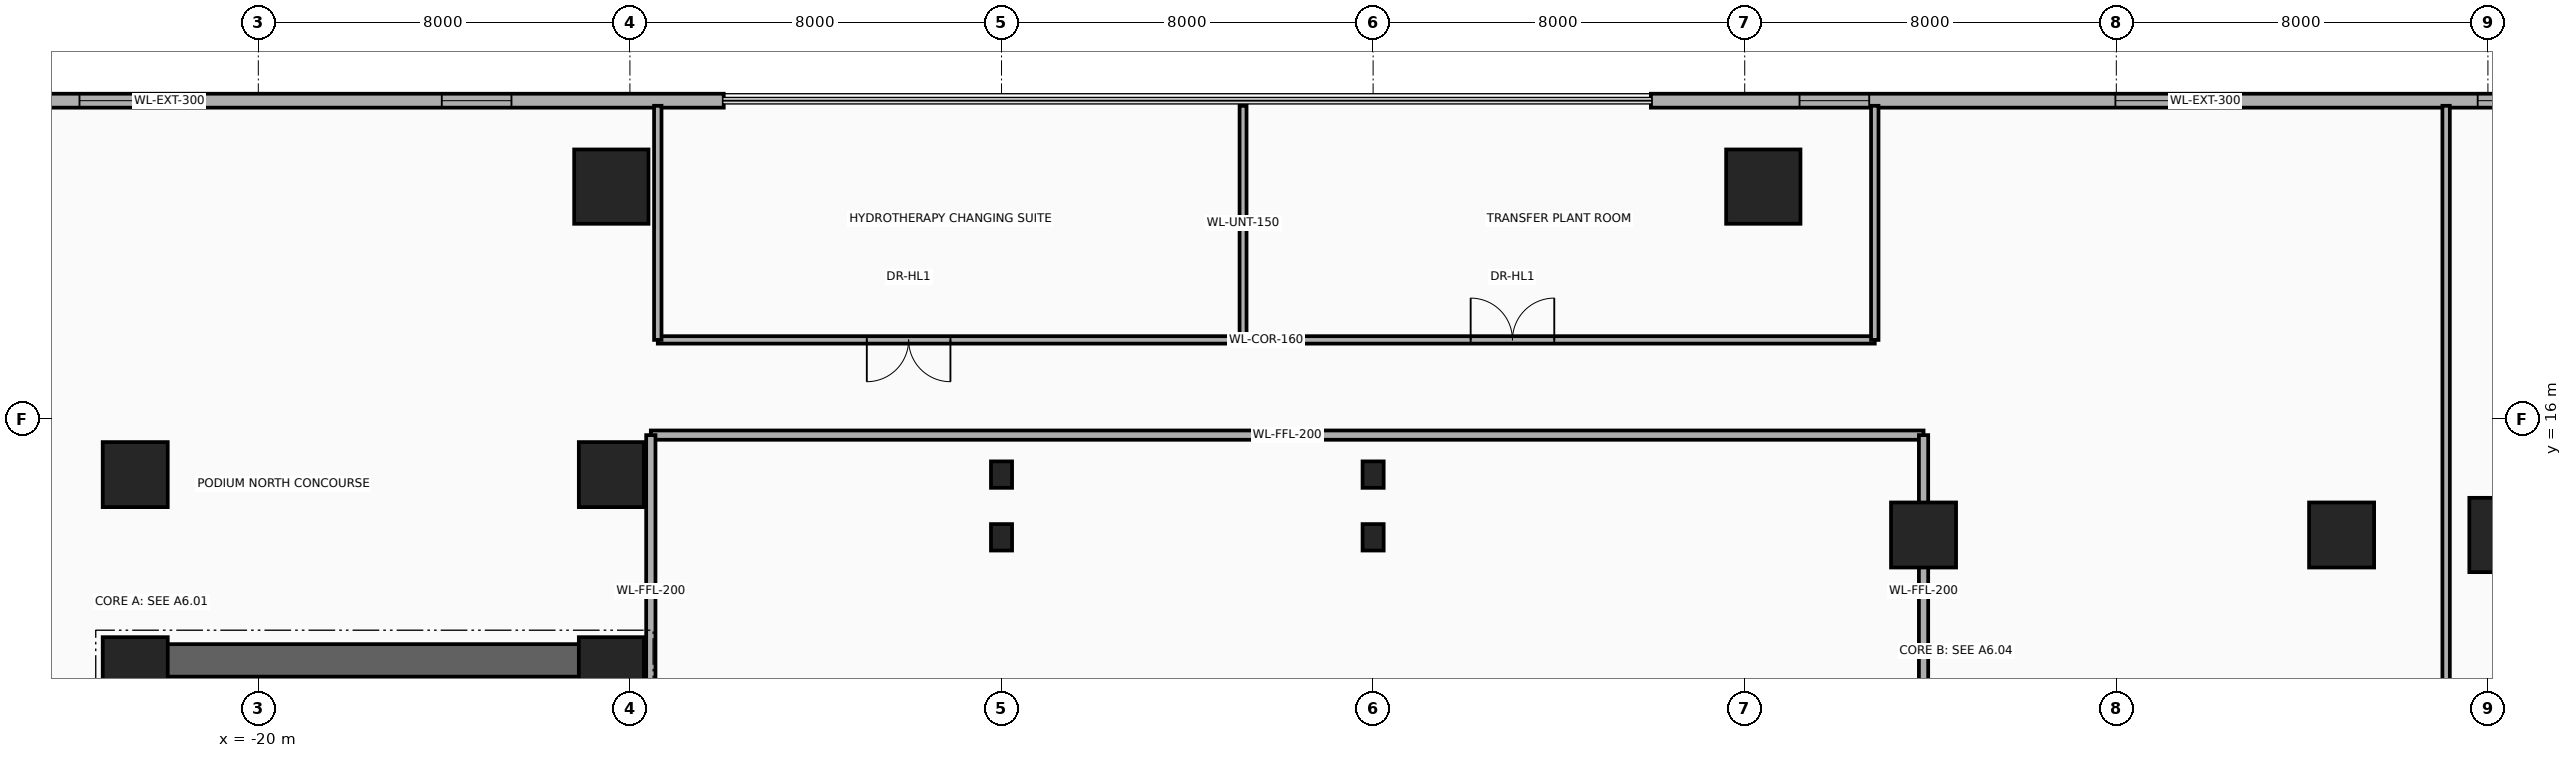
"""IFC4 building model, lengths in metres.
Left out: names, types, materials, properties, quantities, classifications, styles, units other than length and angle.
Written with IfcOpenShell. Run it as: python <this file> out.ifc"""

import sys

from ifc_helpers import new_model, si_unit, direction, frame, frame_2d, origin, origin_2d, place, context, subcontext, project, spatial, rectangle, i_section, extrude, source, transform, mapped, element, fill, save


model = new_model("IFC4")
c1 = context("Model", 3, precision=1e-05, world=origin(), true_north=direction((0.0, 1.0)))
c2 = subcontext(c1, "Body", "Model", "MODEL_VIEW")
j1 = project(units=[si_unit("LENGTHUNIT", "METRE"), si_unit("PLANEANGLEUNIT", "RADIAN")], contexts=[c1])
p1 = place(None, origin())
s1 = spatial("IfcSite", under=j1, at=p1, CompositionType="ELEMENT")
p2 = place(p1, origin())
s2 = spatial("IfcBuilding", under=s1, at=p2, CompositionType="ELEMENT")
p3 = place(p2, frame((0.0, 0.0, 20.8)))
s3 = spatial("IfcBuildingStorey", under=s2, at=p3, CompositionType="ELEMENT", Elevation=20.8)
for number, where, z_axis, x_axis in (
    (1, (-22.16, 1.78, 0.0), (0.0, 0.0, 1.0), (0.0, 1.0, 0.0)),
    (2, (-18.83, 1.78, 0.0), (0.0, 0.0, 1.0), (0.0, 1.0, 0.0)),
):
    element("IfcWall", number, at=place(p3, frame(where, z_axis=z_axis, x_axis=x_axis)), inside=s3, PredefinedType="SHEAR", context=c2, shape_type="SweptSolid", body=[
        extrude(rectangle(XDim=8.67, YDim=0.22, at=frame_2d((4.335, 0.0))), origin(), (0.0, 0.0, 1.0), 4.96),
    ])
p4 = place(p3, frame((-22.65, -11.15, 0.0), z_axis=(0.0, 0.0, 1.0), x_axis=(0.0, 1.0, 0.0)))
e3 = element("IfcWall", 3, at=p4, inside=s3, PredefinedType="SHEAR", context=c2, shape_type="SweptSolid", body=[
    extrude(rectangle(XDim=22.3, YDim=0.7, at=frame_2d((11.15, 0.0))), origin(), (0.0, 0.0, 1.0), 4.96),
])
p5 = place(p3, frame((-22.65, 10.8, 0.0), z_axis=(0.0, 0.0, 1.0), x_axis=(1.0, 0.0, 0.0)))
e4 = element("IfcWall", 4, at=p5, inside=s3, PredefinedType="SHEAR", context=c2, shape_type="SweptSolid", body=[
    extrude(rectangle(XDim=10.25, YDim=0.7, at=frame_2d((5.125, 0.0))), origin(), (0.0, 0.0, 1.0), 4.96),
])
m1 = source(origin(), c2, "Body", "SweptSolid", [
    extrude(rectangle(XDim=1.4, YDim=1.4, at=origin_2d()), origin(), (0.0, 0.0, 1.0), 5.2),
])
for number, where, z_axis, x_axis in (
    (5, (-22.65, 10.6, 0.0), (0.0, 0.0, 1.0), (1.0, 0.0, 0.0)),
    (6, (-12.4, 10.6, 0.0), (0.0, 0.0, 1.0), (1.0, 0.0, 0.0)),
    (7, (-22.65, 14.8, 0.0), (0.0, 0.0, 1.0), (1.0, 0.0, 0.0)),
    (8, (-12.4, 14.8, 0.0), (0.0, 0.0, 1.0), (1.0, 0.0, 0.0)),
    (9, (15.85, 13.5, 0.0), (0.0, 0.0, 1.0), (1.0, 0.0, 0.0)),
    (10, (24.85, 13.5, 0.0), (0.0, 0.0, 1.0), (1.0, 0.0, 0.0)),
):
    element("IfcColumn", number, at=place(p3, frame(where, z_axis=z_axis, x_axis=x_axis)), inside=s3, PredefinedType="COLUMN", context=c2, shape_type="MappedRepresentation", body=[
        mapped(m1, transform((0.0, 0.0, 0.0), x_axis=(1.0, 0.0, 0.0), y_axis=(0.0, 1.0, 0.0), z_axis=(0.0, 0.0, 1.0), scale=1.0)),
    ])
m2 = source(origin(), c2, "Body", "SweptSolid", [
    extrude(rectangle(XDim=1.6, YDim=1.6, at=origin_2d()), origin(), (0.0, 0.0, 1.0), 5.2),
])
for number, where, z_axis, x_axis in (
    (11, (28.4, 13.5, 0.0), (0.0, 0.0, 1.0), (1.0, 0.0, 0.0)),
    (12, (-12.4, 21.0, 0.0), (0.0, 0.0, 1.0), (1.0, 0.0, 0.0)),
    (13, (12.4, 21.0, 0.0), (0.0, 0.0, 1.0), (1.0, 0.0, 0.0)),
):
    element("IfcColumn", number, at=place(p3, frame(where, z_axis=z_axis, x_axis=x_axis)), inside=s3, PredefinedType="COLUMN", context=c2, shape_type="MappedRepresentation", body=[
        mapped(m2, transform((0.0, 0.0, 0.0), x_axis=(1.0, 0.0, 0.0), y_axis=(0.0, 1.0, 0.0), z_axis=(0.0, 0.0, 1.0), scale=1.0)),
    ])
m3 = source(origin(), c2, "Body", "SweptSolid", [
    extrude(i_section(OverallWidth=0.454, OverallDepth=0.569, WebThickness=0.078, FlangeThickness=0.125, at=origin_2d()), origin(), (0.0, 0.0, 1.0), 5.2),
])
for number, where, z_axis, x_axis in (
    (14, (-4.0, 13.45, 0.0), (0.0, 0.0, 1.0), (1.0, 0.0, 0.0)),
    (15, (-4.0, 14.8, 0.0), (0.0, 0.0, 1.0), (1.0, 0.0, 0.0)),
    (16, (4.0, 13.45, 0.0), (0.0, 0.0, 1.0), (1.0, 0.0, 0.0)),
    (17, (4.0, 14.8, 0.0), (0.0, 0.0, 1.0), (1.0, 0.0, 0.0)),
):
    element("IfcColumn", number, at=place(p3, frame(where, z_axis=z_axis, x_axis=x_axis)), inside=s3, PredefinedType="COLUMN", context=c2, shape_type="MappedRepresentation", body=[
        mapped(m3, transform((0.0, 0.0, 0.0), x_axis=(1.0, 0.0, 0.0), y_axis=(0.0, 1.0, 0.0), z_axis=(0.0, 0.0, 1.0), scale=1.0)),
    ])
p6 = place(p3, frame((-33.85, 22.85, 0.0), z_axis=(0.0, 0.0, 1.0), x_axis=(1.0, 0.0, 0.0)))
e18 = element("IfcWall", 18, at=p6, inside=s3, PredefinedType="SOLIDWALL", context=c2, shape_type="SweptSolid", body=[
    extrude(rectangle(XDim=23.87, YDim=0.3, at=frame_2d((11.935, 0.0))), origin(), (0.0, 0.0, 1.0), 4.96),
])
p7 = place(p6, frame((3.2, 0.0, 0.9)))
e19 = element("IfcOpeningElement", 19, at=p7, cuts=e18, PredefinedType="OPENING", context=c2, shape_type="SweptSolid", body=[
    extrude(rectangle(XDim=1.5, YDim=1.75, at=frame_2d((0.75, 0.875))), frame((0.0, 0.165, 0.0), z_axis=(0.0, -1.0, 0.0), x_axis=(1.0, 0.0, 0.0)), (0.0, 0.0, 1.0), 0.33),
])
p8 = place(p6, frame((10.0, 0.0, 0.9)))
e20 = element("IfcOpeningElement", 20, at=p8, cuts=e18, PredefinedType="OPENING", context=c2, shape_type="SweptSolid", body=[
    extrude(rectangle(XDim=1.5, YDim=1.75, at=frame_2d((0.75, 0.875))), frame((0.0, 0.165, 0.0), z_axis=(0.0, -1.0, 0.0), x_axis=(1.0, 0.0, 0.0)), (0.0, 0.0, 1.0), 0.33),
])
p9 = place(p6, frame((17.8, 0.0, 0.9)))
e21 = element("IfcOpeningElement", 21, at=p9, cuts=e18, PredefinedType="OPENING", context=c2, shape_type="SweptSolid", body=[
    extrude(rectangle(XDim=1.5, YDim=1.75, at=frame_2d((0.75, 0.875))), frame((0.0, 0.165, 0.0), z_axis=(0.0, -1.0, 0.0), x_axis=(1.0, 0.0, 0.0)), (0.0, 0.0, 1.0), 0.33),
])
p10 = place(p3, frame((9.98, 22.85, 0.0), z_axis=(0.0, 0.0, 1.0), x_axis=(1.0, 0.0, 0.0)))
e22 = element("IfcWall", 22, at=p10, inside=s3, PredefinedType="SOLIDWALL", context=c2, shape_type="SweptSolid", body=[
    extrude(rectangle(XDim=23.87, YDim=0.3, at=frame_2d((11.935, 0.0))), origin(), (0.0, 0.0, 1.0), 4.96),
])
p11 = place(p10, frame((3.2, 0.0, 0.9)))
e23 = element("IfcOpeningElement", 23, at=p11, cuts=e22, PredefinedType="OPENING", context=c2, shape_type="SweptSolid", body=[
    extrude(rectangle(XDim=1.5, YDim=1.75, at=frame_2d((0.75, 0.875))), frame((0.0, 0.165, 0.0), z_axis=(0.0, -1.0, 0.0), x_axis=(1.0, 0.0, 0.0)), (0.0, 0.0, 1.0), 0.33),
])
p12 = place(p10, frame((10.0, 0.0, 0.9)))
e24 = element("IfcOpeningElement", 24, at=p12, cuts=e22, PredefinedType="OPENING", context=c2, shape_type="SweptSolid", body=[
    extrude(rectangle(XDim=1.5, YDim=1.75, at=frame_2d((0.75, 0.875))), frame((0.0, 0.165, 0.0), z_axis=(0.0, -1.0, 0.0), x_axis=(1.0, 0.0, 0.0)), (0.0, 0.0, 1.0), 0.33),
])
p13 = place(p10, frame((17.8, 0.0, 0.9)))
e25 = element("IfcOpeningElement", 25, at=p13, cuts=e22, PredefinedType="OPENING", context=c2, shape_type="SweptSolid", body=[
    extrude(rectangle(XDim=1.5, YDim=1.75, at=frame_2d((0.75, 0.875))), frame((0.0, 0.165, 0.0), z_axis=(0.0, -1.0, 0.0), x_axis=(1.0, 0.0, 0.0)), (0.0, 0.0, 1.0), 0.33),
])
p14 = place(p3, frame((-11.4, 17.7, 0.0), z_axis=(0.0, 0.0, 1.0), x_axis=(1.0, 0.0, 0.0)))
e26 = element("IfcWall", 26, at=p14, inside=s3, PredefinedType="PARTITIONING", context=c2, shape_type="SweptSolid", body=[
    extrude(rectangle(XDim=26.2, YDim=0.16, at=frame_2d((13.1, 0.0))), origin(), (0.0, 0.0, 1.0), 4.96),
])
p15 = place(p14, frame((4.5, 0.0, 0.0)))
e27 = element("IfcOpeningElement", 27, at=p15, cuts=e26, PredefinedType="OPENING", context=c2, shape_type="SweptSolid", body=[
    extrude(rectangle(XDim=1.8, YDim=2.15, at=frame_2d((0.9, 1.075))), frame((0.0, 0.095, 0.0), z_axis=(0.0, -1.0, 0.0), x_axis=(1.0, 0.0, 0.0)), (0.0, 0.0, 1.0), 0.19),
])
p16 = place(p14, frame((17.5, 0.0, 0.0)))
e28 = element("IfcOpeningElement", 28, at=p16, cuts=e26, PredefinedType="OPENING", context=c2, shape_type="SweptSolid", body=[
    extrude(rectangle(XDim=1.8, YDim=2.15, at=frame_2d((0.9, 1.075))), frame((0.0, 0.095, 0.0), z_axis=(0.0, -1.0, 0.0), x_axis=(1.0, 0.0, 0.0)), (0.0, 0.0, 1.0), 0.19),
])
for number, where, z_axis, x_axis in (
    (29, (-11.4, 17.7, 0.0), (0.0, 0.0, 1.0), (0.0, 1.0, 0.0)),
    (30, (14.8, 17.7, 0.0), (0.0, 0.0, 1.0), (0.0, 1.0, 0.0)),
):
    element("IfcWall", number, at=place(p3, frame(where, z_axis=z_axis, x_axis=x_axis)), inside=s3, PredefinedType="PARTITIONING", context=c2, shape_type="SweptSolid", body=[
        extrude(rectangle(XDim=5.04, YDim=0.16, at=frame_2d((2.52, 0.0))), origin(), (0.0, 0.0, 1.0), 3.997),
    ])
p17 = place(p3, frame((1.2, 17.7, 0.0), z_axis=(0.0, 0.0, 1.0), x_axis=(0.0, 1.0, 0.0)))
e31 = element("IfcWall", 31, at=p17, inside=s3, PredefinedType="PARTITIONING", context=c2, shape_type="SweptSolid", body=[
    extrude(rectangle(XDim=5.04, YDim=0.15, at=frame_2d((2.52, 0.0))), origin(), (0.0, 0.0, 1.0), 3.997),
])
p18 = place(p3, frame((27.1, -22.74, 0.0), z_axis=(0.0, 0.0, 1.0), x_axis=(0.0, 1.0, 0.0)))
e32 = element("IfcWall", 32, at=p18, inside=s3, PredefinedType="PARTITIONING", context=c2, shape_type="SweptSolid", body=[
    extrude(rectangle(XDim=45.48, YDim=0.16, at=frame_2d((22.74, 0.0))), origin(), (0.0, 0.0, 1.0), 3.745),
])
p19 = place(p18, frame((7.0, 0.0, 0.0)))
e33 = element("IfcOpeningElement", 33, at=p19, cuts=e32, PredefinedType="OPENING", context=c2, shape_type="SweptSolid", body=[
    extrude(rectangle(XDim=1.8, YDim=2.15, at=frame_2d((0.9, 1.075))), frame((0.0, 0.095, 0.0), z_axis=(0.0, -1.0, 0.0), x_axis=(1.0, 0.0, 0.0)), (0.0, 0.0, 1.0), 0.19),
])
p20 = place(p18, frame((25.0, 0.0, 0.0)))
e34 = element("IfcOpeningElement", 34, at=p20, cuts=e32, PredefinedType="OPENING", context=c2, shape_type="SweptSolid", body=[
    extrude(rectangle(XDim=1.8, YDim=2.15, at=frame_2d((0.9, 1.075))), frame((0.0, 0.095, 0.0), z_axis=(0.0, -1.0, 0.0), x_axis=(1.0, 0.0, 0.0)), (0.0, 0.0, 1.0), 0.19),
])
p21 = place(p3, frame((-11.55, 15.65, 0.0), z_axis=(0.0, 0.0, 1.0), x_axis=(1.0, 0.0, 0.0)))
e35 = element("IfcWall", 35, at=p21, inside=s3, PredefinedType="PARTITIONING", context=c2, shape_type="SweptSolid", body=[
    extrude(rectangle(XDim=27.4, YDim=0.2, at=frame_2d((13.7, 0.0))), origin(), (0.0, 0.0, 1.0), 4.96),
])
for number, where, z_axis, x_axis in (
    (36, (-11.55, 8.95, 0.0), (0.0, 0.0, 1.0), (0.0, 1.0, 0.0)),
    (37, (15.85, 8.95, 0.0), (0.0, 0.0, 1.0), (0.0, 1.0, 0.0)),
):
    element("IfcWall", number, at=place(p3, frame(where, z_axis=z_axis, x_axis=x_axis)), inside=s3, PredefinedType="PARTITIONING", context=c2, shape_type="SweptSolid", body=[
        extrude(rectangle(XDim=6.7, YDim=0.2, at=frame_2d((3.35, 0.0))), origin(), (0.0, 0.0, 1.0), 3.745),
    ])
p22 = place(p8, origin())
e38 = element("IfcWindow", 38, at=p22, inside=s3, PartitioningType="SINGLE_PANEL", PredefinedType="WINDOW", context=c2, shape_type="SweptSolid", body=[
    extrude(rectangle(XDim=1.5, YDim=1.75, at=frame_2d((0.75, 0.875))), frame((0.0, 0.03, 0.0), z_axis=(0.0, -1.0, 0.0), x_axis=(1.0, 0.0, 0.0)), (0.0, 0.0, 1.0), 0.06),
])
fill(e20, e38)
p23 = place(p9, origin())
e39 = element("IfcWindow", 39, at=p23, inside=s3, PartitioningType="SINGLE_PANEL", PredefinedType="WINDOW", context=c2, shape_type="SweptSolid", body=[
    extrude(rectangle(XDim=1.5, YDim=1.75, at=frame_2d((0.75, 0.875))), frame((0.0, 0.03, 0.0), z_axis=(0.0, -1.0, 0.0), x_axis=(1.0, 0.0, 0.0)), (0.0, 0.0, 1.0), 0.06),
])
fill(e21, e39)
p24 = place(p11, origin())
e40 = element("IfcWindow", 40, at=p24, inside=s3, PartitioningType="SINGLE_PANEL", PredefinedType="WINDOW", context=c2, shape_type="SweptSolid", body=[
    extrude(rectangle(XDim=1.5, YDim=1.75, at=frame_2d((0.75, 0.875))), frame((0.0, 0.03, 0.0), z_axis=(0.0, -1.0, 0.0), x_axis=(1.0, 0.0, 0.0)), (0.0, 0.0, 1.0), 0.06),
])
fill(e23, e40)
p25 = place(p12, origin())
e41 = element("IfcWindow", 41, at=p25, inside=s3, PartitioningType="SINGLE_PANEL", PredefinedType="WINDOW", context=c2, shape_type="SweptSolid", body=[
    extrude(rectangle(XDim=1.5, YDim=1.75, at=frame_2d((0.75, 0.875))), frame((0.0, 0.03, 0.0), z_axis=(0.0, -1.0, 0.0), x_axis=(1.0, 0.0, 0.0)), (0.0, 0.0, 1.0), 0.06),
])
fill(e24, e41)
p26 = place(p13, origin())
e42 = element("IfcWindow", 42, at=p26, inside=s3, PartitioningType="SINGLE_PANEL", PredefinedType="WINDOW", context=c2, shape_type="SweptSolid", body=[
    extrude(rectangle(XDim=1.5, YDim=1.75, at=frame_2d((0.75, 0.875))), frame((0.0, 0.03, 0.0), z_axis=(0.0, -1.0, 0.0), x_axis=(1.0, 0.0, 0.0)), (0.0, 0.0, 1.0), 0.06),
])
fill(e25, e42)
p27 = place(p15, frame((1.8, 0.0, 0.0), z_axis=(0.0, 0.0, 1.0), x_axis=(-1.0, 0.0, 0.0)))
e43 = element("IfcDoor", 43, at=p27, inside=s3, OperationType="DOUBLE_DOOR_SINGLE_SWING", PredefinedType="DOOR", context=c2, shape_type="SweptSolid", body=[
    extrude(rectangle(XDim=1.8, YDim=2.15, at=frame_2d((0.9, 1.075))), frame((0.0, 0.025, 0.0), z_axis=(0.0, -1.0, 0.0), x_axis=(1.0, 0.0, 0.0)), (0.0, 0.0, 1.0), 0.05),
])
fill(e27, e43)
p28 = place(p16, origin())
e44 = element("IfcDoor", 44, at=p28, inside=s3, OperationType="DOUBLE_DOOR_SINGLE_SWING", PredefinedType="DOOR", context=c2, shape_type="SweptSolid", body=[
    extrude(rectangle(XDim=1.8, YDim=2.15, at=frame_2d((0.9, 1.075))), frame((0.0, 0.025, 0.0), z_axis=(0.0, -1.0, 0.0), x_axis=(1.0, 0.0, 0.0)), (0.0, 0.0, 1.0), 0.05),
])
fill(e28, e44)
save(model, sys.argv[1])
